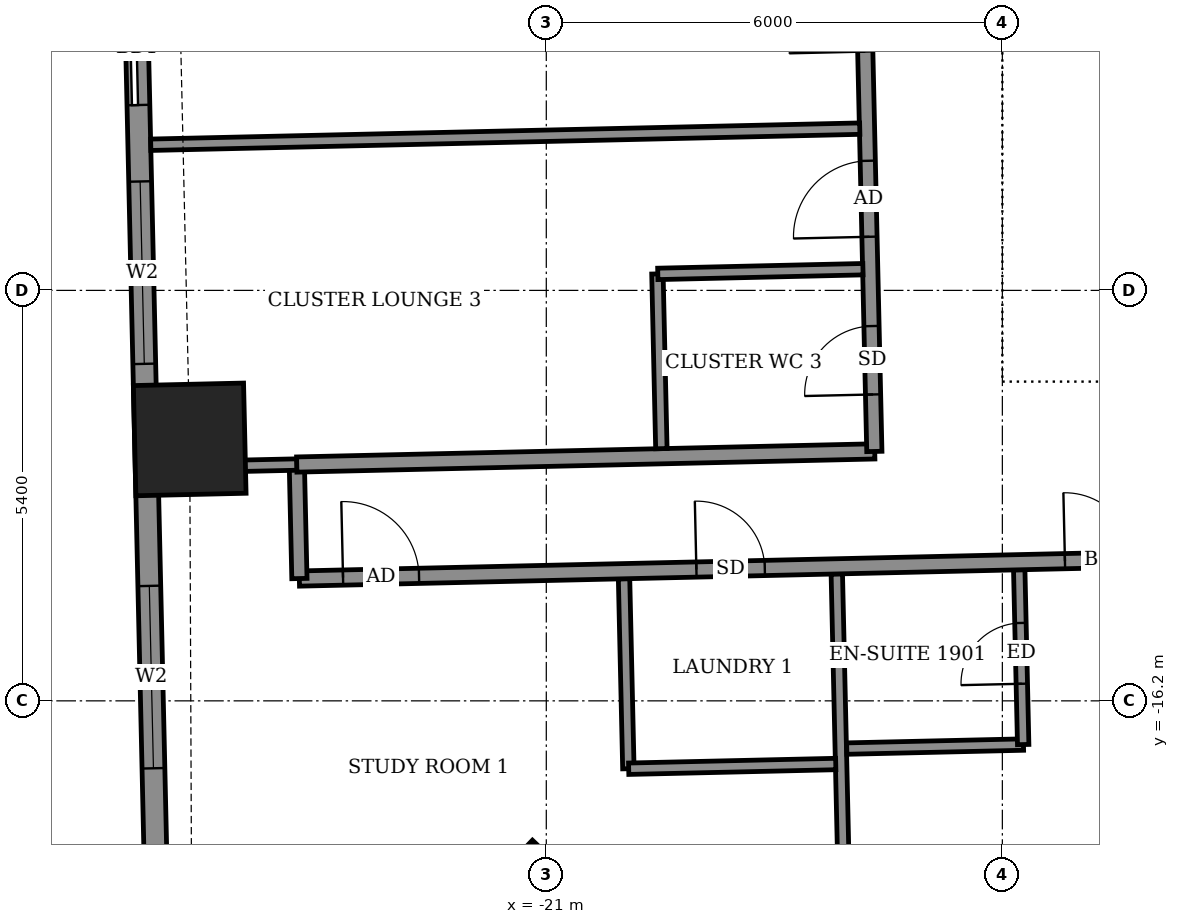
"""IFC4 building model, lengths in metres.
Left out: names, types, materials, properties, quantities, classifications, styles, units other than length and angle.
Written with IfcOpenShell. Run it as: python <this file> out.ifc"""

import sys

from ifc_helpers import new_model, si_unit, direction, frame, frame_2d, origin, origin_2d, place, context, subcontext, project, spatial, rectangle, extrude, element, fill, save


model = new_model("IFC4")
c1 = context("Model", 3, precision=1e-05, world=origin(), true_north=direction((0.0, 1.0)))
c2 = subcontext(c1, "Body", "Model", "MODEL_VIEW")
j1 = project(units=[si_unit("LENGTHUNIT", "METRE"), si_unit("PLANEANGLEUNIT", "RADIAN")], contexts=[c1])
p1 = place(None, origin())
s1 = spatial("IfcSite", under=j1, at=p1, CompositionType="ELEMENT")
p2 = place(p1, origin())
s2 = spatial("IfcBuilding", under=s1, at=p2, CompositionType="ELEMENT")
p3 = place(p2, frame((0.0, 0.0, 79.3)))
s3 = spatial("IfcBuildingStorey", under=s2, at=p3, CompositionType="ELEMENT", Elevation=79.3)
for number, where, z_axis, x_axis in (
    (1, (-25.691, -12.76, -0.55), (0.0, 0.0, 1.0), (0.023, -1.0, 0.0)),
    (2, (-21.159, -19.059, -0.55), (0.0, 0.0, 1.0), (0.723, -0.691, 0.0)),
):
    element("IfcColumn", number, at=place(p3, frame(where, z_axis=z_axis, x_axis=x_axis)), inside=s3, PredefinedType="COLUMN", context=c2, shape_type="SweptSolid", body=[
        extrude(rectangle(XDim=1.45, YDim=1.45, at=origin_2d()), origin(), (0.0, 0.0, 1.0), 3.6),
    ])
p4 = place(p3, frame((-26.424, -5.808, 0.0), z_axis=(0.0, 0.0, 1.0), x_axis=(0.022654755793, -0.999743348085, 0.0)))
e3 = element("IfcWall", 3, at=p4, inside=s3, PredefinedType="SOLIDWALL", context=c2, shape_type="SweptSolid", body=[
    extrude(rectangle(XDim=13.729, YDim=0.3, at=frame_2d((6.865, 0.0))), origin(), (0.0, 0.0, 1.0), 3.05),
])
p5 = place(p4, frame((1.054, 0.0, 0.0)))
e4 = element("IfcOpeningElement", 4, at=p5, cuts=e3, PredefinedType="OPENING", context=c2, shape_type="SweptSolid", body=[
    extrude(rectangle(XDim=1.5, YDim=2.4, at=frame_2d((0.75, 1.2))), frame((0.0, 0.16, 0.0), z_axis=(0.0, -1.0, 0.0), x_axis=(1.0, 0.0, 0.0)), (0.0, 0.0, 1.0), 0.32),
])
p6 = place(p4, frame((3.56, 0.0, 0.9)))
e5 = element("IfcOpeningElement", 5, at=p6, cuts=e3, PredefinedType="OPENING", context=c2, shape_type="SweptSolid", body=[
    extrude(rectangle(XDim=2.4, YDim=1.5, at=frame_2d((1.2, 0.75))), frame((0.0, 0.16, 0.0), z_axis=(0.0, -1.0, 0.0), x_axis=(1.0, 0.0, 0.0)), (0.0, 0.0, 1.0), 0.32),
])
p7 = place(p4, frame((8.882, 0.0, 0.9)))
e6 = element("IfcOpeningElement", 6, at=p7, cuts=e3, PredefinedType="OPENING", context=c2, shape_type="SweptSolid", body=[
    extrude(rectangle(XDim=2.4, YDim=1.5, at=frame_2d((1.2, 0.75))), frame((0.0, 0.16, 0.0), z_axis=(0.0, -1.0, 0.0), x_axis=(1.0, 0.0, 0.0)), (0.0, 0.0, 1.0), 0.32),
])
p8 = place(p3, frame((-16.968, -23.778, 0.0), z_axis=(0.0, 0.0, 1.0), x_axis=(-0.022697424684, 0.999742380272, 0.0)))
e7 = element("IfcWall", 7, at=p8, inside=s3, PredefinedType="PARTITIONING", context=c2, shape_type="SweptSolid", body=[
    extrude(rectangle(XDim=9.25, YDim=0.15, at=frame_2d((4.625, 0.0))), origin(), (0.0, 0.0, 1.0), 2.55),
])
p9 = place(p3, frame((-19.92, -17.093, 0.0), z_axis=(0.0, 0.0, 1.0), x_axis=(-0.022854521249, 0.999738801317, 0.0)))
e8 = element("IfcWall", 8, at=p9, inside=s3, PredefinedType="PARTITIONING", context=c2, shape_type="SweptSolid", body=[
    extrude(rectangle(XDim=2.5, YDim=0.15, at=frame_2d((1.25, 0.0))), origin(), (0.0, 0.0, 1.0), 3.05),
])
p10 = place(p3, frame((-19.916, -17.093, 0.0), z_axis=(0.0, 0.0, 1.0), x_axis=(0.999741002259, 0.022758040381, 0.0)))
e9 = element("IfcWall", 9, at=p10, inside=s3, PredefinedType="PARTITIONING", context=c2, shape_type="SweptSolid", body=[
    extrude(rectangle(XDim=2.725, YDim=0.15, at=frame_2d((1.362, 0.0))), origin(), (0.0, 0.0, 1.0), 3.05),
])
p11 = place(p3, frame((-17.047, -16.828, 0.0), z_axis=(0.0, 0.0, 1.0), x_axis=(0.99974053329, 0.022778632478, 0.0)))
e10 = element("IfcWall", 10, at=p11, inside=s3, PredefinedType="PARTITIONING", context=c2, shape_type="SweptSolid", body=[
    extrude(rectangle(XDim=2.326, YDim=0.15, at=frame_2d((1.163, 0.0))), origin(), (0.0, 0.0, 1.0), 3.05),
])
p12 = place(p3, frame((-14.726, -16.775, 0.0), z_axis=(0.0, 0.0, 1.0), x_axis=(-0.022615284993, 0.999744241736, 0.0)))
e11 = element("IfcWall", 11, at=p12, inside=s3, PredefinedType="PARTITIONING", context=c2, shape_type="SweptSolid", body=[
    extrude(rectangle(XDim=2.299, YDim=0.15, at=frame_2d((1.15, 0.0))), origin(), (0.0, 0.0, 1.0), 3.05),
])
p13 = place(p12, frame((0.8, 0.0, 0.0)))
e12 = element("IfcOpeningElement", 12, at=p13, cuts=e11, PredefinedType="OPENING", context=c2, shape_type="SweptSolid", body=[
    extrude(rectangle(XDim=0.8, YDim=2.1, at=frame_2d((0.4, 1.05))), frame((0.0, 0.085, 0.0), z_axis=(0.0, -1.0, 0.0), x_axis=(1.0, 0.0, 0.0)), (0.0, 0.0, 1.0), 0.17),
])
p14 = place(p3, frame((-24.249, -14.591, 0.0), z_axis=(0.0, 0.0, 1.0), x_axis=(0.999742227308, 0.022704161211, 0.0)))
e13 = element("IfcWall", 13, at=p14, inside=s3, PredefinedType="PARTITIONING", context=c2, shape_type="SweptSolid", body=[
    extrude(rectangle(XDim=52.421, YDim=0.2, at=frame_2d((26.211, 0.0))), origin(), (0.0, 0.0, 1.0), 3.05),
])
p15 = place(p14, frame((0.575, 0.0, 0.0)))
e14 = element("IfcOpeningElement", 14, at=p15, cuts=e13, PredefinedType="OPENING", context=c2, shape_type="SweptSolid", body=[
    extrude(rectangle(XDim=1.0, YDim=2.1, at=frame_2d((0.5, 1.05))), frame((0.0, 0.11, 0.0), z_axis=(0.0, -1.0, 0.0), x_axis=(1.0, 0.0, 0.0)), (0.0, 0.0, 1.0), 0.22),
])
p16 = place(p14, frame((5.225, 0.0, 0.0)))
e15 = element("IfcOpeningElement", 15, at=p16, cuts=e13, PredefinedType="OPENING", context=c2, shape_type="SweptSolid", body=[
    extrude(rectangle(XDim=0.9, YDim=2.1, at=frame_2d((0.45, 1.05))), frame((0.0, 0.11, 0.0), z_axis=(0.0, -1.0, 0.0), x_axis=(1.0, 0.0, 0.0)), (0.0, 0.0, 1.0), 0.22),
])
p17 = place(p14, frame((10.075, 0.0, 0.0)))
e16 = element("IfcOpeningElement", 16, at=p17, cuts=e13, PredefinedType="OPENING", context=c2, shape_type="SweptSolid", body=[
    extrude(rectangle(XDim=0.9, YDim=2.1, at=frame_2d((0.45, 1.05))), frame((0.0, 0.11, 0.0), z_axis=(0.0, -1.0, 0.0), x_axis=(1.0, 0.0, 0.0)), (0.0, 0.0, 1.0), 0.22),
])
p18 = place(p14, frame((12.1, 0.0, 0.0)))
e17 = element("IfcOpeningElement", 17, at=p18, cuts=e13, PredefinedType="OPENING", context=c2, shape_type="SweptSolid", body=[
    extrude(rectangle(XDim=0.9, YDim=2.1, at=frame_2d((0.45, 1.05))), frame((0.0, 0.11, 0.0), z_axis=(0.0, -1.0, 0.0), x_axis=(1.0, 0.0, 0.0)), (0.0, 0.0, 1.0), 0.22),
])
p19 = place(p14, frame((19.025, 0.0, 0.0)))
e18 = element("IfcOpeningElement", 18, at=p19, cuts=e13, PredefinedType="OPENING", context=c2, shape_type="SweptSolid", body=[
    extrude(rectangle(XDim=0.9, YDim=2.1, at=frame_2d((0.45, 1.05))), frame((0.0, 0.11, 0.0), z_axis=(0.0, -1.0, 0.0), x_axis=(1.0, 0.0, 0.0)), (0.0, 0.0, 1.0), 0.22),
])
p20 = place(p14, frame((21.225, 0.0, 0.0)))
e19 = element("IfcOpeningElement", 19, at=p20, cuts=e13, PredefinedType="OPENING", context=c2, shape_type="SweptSolid", body=[
    extrude(rectangle(XDim=0.9, YDim=2.1, at=frame_2d((0.45, 1.05))), frame((0.0, 0.11, 0.0), z_axis=(0.0, -1.0, 0.0), x_axis=(1.0, 0.0, 0.0)), (0.0, 0.0, 1.0), 0.22),
])
p21 = place(p14, frame((28.175, 0.0, 0.0)))
e20 = element("IfcOpeningElement", 20, at=p21, cuts=e13, PredefinedType="OPENING", context=c2, shape_type="SweptSolid", body=[
    extrude(rectangle(XDim=0.9, YDim=2.1, at=frame_2d((0.45, 1.05))), frame((0.0, 0.11, 0.0), z_axis=(0.0, -1.0, 0.0), x_axis=(1.0, 0.0, 0.0)), (0.0, 0.0, 1.0), 0.22),
])
p22 = place(p14, frame((30.425, 0.0, 0.0)))
e21 = element("IfcOpeningElement", 21, at=p22, cuts=e13, PredefinedType="OPENING", context=c2, shape_type="SweptSolid", body=[
    extrude(rectangle(XDim=0.9, YDim=2.1, at=frame_2d((0.45, 1.05))), frame((0.0, 0.11, 0.0), z_axis=(0.0, -1.0, 0.0), x_axis=(1.0, 0.0, 0.0)), (0.0, 0.0, 1.0), 0.22),
])
p23 = place(p14, frame((37.4, 0.0, 0.0)))
e22 = element("IfcOpeningElement", 22, at=p23, cuts=e13, PredefinedType="OPENING", context=c2, shape_type="SweptSolid", body=[
    extrude(rectangle(XDim=0.9, YDim=2.1, at=frame_2d((0.45, 1.05))), frame((0.0, 0.11, 0.0), z_axis=(0.0, -1.0, 0.0), x_axis=(1.0, 0.0, 0.0)), (0.0, 0.0, 1.0), 0.22),
])
p24 = place(p14, frame((39.375, 0.0, 0.0)))
e23 = element("IfcOpeningElement", 23, at=p24, cuts=e13, PredefinedType="OPENING", context=c2, shape_type="SweptSolid", body=[
    extrude(rectangle(XDim=0.9, YDim=2.1, at=frame_2d((0.45, 1.05))), frame((0.0, 0.11, 0.0), z_axis=(0.0, -1.0, 0.0), x_axis=(1.0, 0.0, 0.0)), (0.0, 0.0, 1.0), 0.22),
])
p25 = place(p14, frame((49.661, 0.0, 0.0)))
e24 = element("IfcOpeningElement", 24, at=p25, cuts=e13, PredefinedType="OPENING", context=c2, shape_type="SweptSolid", body=[
    extrude(rectangle(XDim=1.0, YDim=2.1, at=frame_2d((0.5, 1.05))), frame((0.0, 0.11, 0.0), z_axis=(0.0, -1.0, 0.0), x_axis=(1.0, 0.0, 0.0)), (0.0, 0.0, 1.0), 0.22),
])
p26 = place(p14, frame((44.025, 0.0, 0.0)))
e25 = element("IfcOpeningElement", 25, at=p26, cuts=e13, PredefinedType="OPENING", context=c2, shape_type="SweptSolid", body=[
    extrude(rectangle(XDim=0.9, YDim=2.1, at=frame_2d((0.45, 1.05))), frame((0.0, 0.11, 0.0), z_axis=(0.0, -1.0, 0.0), x_axis=(1.0, 0.0, 0.0)), (0.0, 0.0, 1.0), 0.22),
])
p27 = place(p3, frame((-24.248, -14.591, 0.0), z_axis=(0.0, 0.0, 1.0), x_axis=(-0.022617910375, 0.999744182344, 0.0)))
e26 = element("IfcWall", 26, at=p27, inside=s3, PredefinedType="PARTITIONING", context=c2, shape_type="SweptSolid", body=[
    extrude(rectangle(XDim=1.5, YDim=0.2, at=frame_2d((0.75, 0.0))), origin(), (0.0, 0.0, 1.0), 3.05),
])
p28 = place(p3, frame((-26.108, -13.132, 0.0), z_axis=(0.0, 0.0, 1.0), x_axis=(0.999748611628, 0.02242127443, 0.0)))
e27 = element("IfcWall", 27, at=p28, inside=s3, PredefinedType="PARTITIONING", context=c2, shape_type="SweptSolid", body=[
    extrude(rectangle(XDim=1.829, YDim=0.15, at=frame_2d((0.915, 0.0))), origin(), (0.0, 0.0, 1.0), 3.05),
])
p29 = place(p3, frame((-24.283, -13.091, 0.0), z_axis=(0.0, 0.0, 1.0), x_axis=(0.999741006317, 0.022757862116, 0.0)))
e28 = element("IfcWall", 28, at=p29, inside=s3, PredefinedType="PARTITIONING", context=c2, shape_type="SweptSolid", body=[
    extrude(rectangle(XDim=7.606, YDim=0.2, at=frame_2d((3.803, 0.0))), origin(), (0.0, 0.0, 1.0), 3.05),
])
p30 = place(p3, frame((-19.486, -12.882, 0.0), z_axis=(0.0, 0.0, 1.0), x_axis=(-0.022612884682, 0.999744296031, 0.0)))
e29 = element("IfcWall", 29, at=p30, inside=s3, PredefinedType="PARTITIONING", context=c2, shape_type="SweptSolid", body=[
    extrude(rectangle(XDim=2.3, YDim=0.15, at=frame_2d((1.15, 0.0))), origin(), (0.0, 0.0, 1.0), 3.05),
])
p31 = place(p3, frame((-16.684, -12.919, 0.0), z_axis=(0.0, 0.0, 1.0), x_axis=(-0.022706151961, 0.999742182097, 0.0)))
e30 = element("IfcWall", 30, at=p31, inside=s3, PredefinedType="PARTITIONING", context=c2, shape_type="SweptSolid", body=[
    extrude(rectangle(XDim=25.45, YDim=0.2, at=frame_2d((12.725, 0.0))), origin(), (0.0, 0.0, 1.0), 3.05),
])
p32 = place(p31, frame((23.938, 0.0, 0.0)))
e31 = element("IfcOpeningElement", 31, at=p32, cuts=e30, PredefinedType="OPENING", context=c2, shape_type="SweptSolid", body=[
    extrude(rectangle(XDim=1.0, YDim=2.1, at=frame_2d((0.5, 1.05))), frame((0.0, 0.11, 0.0), z_axis=(0.0, -1.0, 0.0), x_axis=(1.0, 0.0, 0.0)), (0.0, 0.0, 1.0), 0.22),
])
p33 = place(p31, frame((21.775, 0.0, 0.0)))
e32 = element("IfcOpeningElement", 32, at=p33, cuts=e30, PredefinedType="OPENING", context=c2, shape_type="SweptSolid", body=[
    extrude(rectangle(XDim=0.9, YDim=2.1, at=frame_2d((0.45, 1.05))), frame((0.0, 0.11, 0.0), z_axis=(0.0, -1.0, 0.0), x_axis=(1.0, 0.0, 0.0)), (0.0, 0.0, 1.0), 0.22),
])
p34 = place(p31, frame((16.825, 0.0, 0.0)))
e33 = element("IfcOpeningElement", 33, at=p34, cuts=e30, PredefinedType="OPENING", context=c2, shape_type="SweptSolid", body=[
    extrude(rectangle(XDim=1.0, YDim=2.1, at=frame_2d((0.5, 1.05))), frame((0.0, 0.11, 0.0), z_axis=(0.0, -1.0, 0.0), x_axis=(1.0, 0.0, 0.0)), (0.0, 0.0, 1.0), 0.22),
])
p35 = place(p31, frame((19.175, 0.0, 0.0)))
e34 = element("IfcOpeningElement", 34, at=p35, cuts=e30, PredefinedType="OPENING", context=c2, shape_type="SweptSolid", body=[
    extrude(rectangle(XDim=0.9, YDim=2.1, at=frame_2d((0.45, 1.05))), frame((0.0, 0.11, 0.0), z_axis=(0.0, -1.0, 0.0), x_axis=(1.0, 0.0, 0.0)), (0.0, 0.0, 1.0), 0.22),
])
p36 = place(p31, frame((14.9, 0.0, 0.0)))
e35 = element("IfcOpeningElement", 35, at=p36, cuts=e30, PredefinedType="OPENING", context=c2, shape_type="SweptSolid", body=[
    extrude(rectangle(XDim=1.0, YDim=2.1, at=frame_2d((0.5, 1.05))), frame((0.0, 0.11, 0.0), z_axis=(0.0, -1.0, 0.0), x_axis=(1.0, 0.0, 0.0)), (0.0, 0.0, 1.0), 0.22),
])
p37 = place(p31, frame((12.625, 0.0, 0.0)))
e36 = element("IfcOpeningElement", 36, at=p37, cuts=e30, PredefinedType="OPENING", context=c2, shape_type="SweptSolid", body=[
    extrude(rectangle(XDim=0.9, YDim=2.1, at=frame_2d((0.45, 1.05))), frame((0.0, 0.11, 0.0), z_axis=(0.0, -1.0, 0.0), x_axis=(1.0, 0.0, 0.0)), (0.0, 0.0, 1.0), 0.22),
])
p38 = place(p31, frame((10.225, 0.0, 0.0)))
e37 = element("IfcOpeningElement", 37, at=p38, cuts=e30, PredefinedType="OPENING", context=c2, shape_type="SweptSolid", body=[
    extrude(rectangle(XDim=1.0, YDim=2.1, at=frame_2d((0.5, 1.05))), frame((0.0, 0.11, 0.0), z_axis=(0.0, -1.0, 0.0), x_axis=(1.0, 0.0, 0.0)), (0.0, 0.0, 1.0), 0.22),
])
p39 = place(p31, frame((8.025, 0.0, 0.0)))
e38 = element("IfcOpeningElement", 38, at=p39, cuts=e30, PredefinedType="OPENING", context=c2, shape_type="SweptSolid", body=[
    extrude(rectangle(XDim=0.9, YDim=2.1, at=frame_2d((0.45, 1.05))), frame((0.0, 0.11, 0.0), z_axis=(0.0, -1.0, 0.0), x_axis=(1.0, 0.0, 0.0)), (0.0, 0.0, 1.0), 0.22),
])
p40 = place(p31, frame((5.262, 0.0, 0.0)))
e39 = element("IfcOpeningElement", 39, at=p40, cuts=e30, PredefinedType="OPENING", context=c2, shape_type="SweptSolid", body=[
    extrude(rectangle(XDim=1.0, YDim=2.1, at=frame_2d((0.5, 1.05))), frame((0.0, 0.11, 0.0), z_axis=(0.0, -1.0, 0.0), x_axis=(1.0, 0.0, 0.0)), (0.0, 0.0, 1.0), 0.22),
])
p41 = place(p31, frame((2.825, 0.0, 0.0)))
e40 = element("IfcOpeningElement", 40, at=p41, cuts=e30, PredefinedType="OPENING", context=c2, shape_type="SweptSolid", body=[
    extrude(rectangle(XDim=1.0, YDim=2.1, at=frame_2d((0.5, 1.05))), frame((0.0, 0.11, 0.0), z_axis=(0.0, -1.0, 0.0), x_axis=(1.0, 0.0, 0.0)), (0.0, 0.0, 1.0), 0.22),
])
p42 = place(p31, frame((0.75, 0.0, 0.0)))
e41 = element("IfcOpeningElement", 41, at=p42, cuts=e30, PredefinedType="OPENING", context=c2, shape_type="SweptSolid", body=[
    extrude(rectangle(XDim=0.9, YDim=2.1, at=frame_2d((0.45, 1.05))), frame((0.0, 0.11, 0.0), z_axis=(0.0, -1.0, 0.0), x_axis=(1.0, 0.0, 0.0)), (0.0, 0.0, 1.0), 0.22),
])
p43 = place(p3, frame((-19.533, -10.583, 0.0), z_axis=(0.0, 0.0, 1.0), x_axis=(0.999736155505, 0.022969966847, 0.0)))
e42 = element("IfcWall", 42, at=p43, inside=s3, PredefinedType="PARTITIONING", context=c2, shape_type="SweptSolid", body=[
    extrude(rectangle(XDim=2.7, YDim=0.15, at=frame_2d((1.35, 0.0))), origin(), (0.0, 0.0, 1.0), 3.05),
])
p44 = place(p3, frame((-26.204, -8.884, 0.0), z_axis=(0.0, 0.0, 1.0), x_axis=(0.999742051634, 0.022711895436, 0.0)))
e43 = element("IfcWall", 43, at=p44, inside=s3, PredefinedType="PARTITIONING", context=c2, shape_type="SweptSolid", body=[
    extrude(rectangle(XDim=9.331, YDim=0.15, at=frame_2d((4.665, 0.0))), origin(), (0.0, 0.0, 1.0), 2.55),
])
p45 = place(p3, frame((-14.9, -11.35, 0.0), z_axis=(0.0, 0.0, 1.0), x_axis=(1.0, 0.0, 0.0)))
e44 = element("IfcWall", 44, at=p45, inside=s3, PredefinedType="SHEAR", context=c2, shape_type="SweptSolid", body=[
    extrude(rectangle(XDim=29.8, YDim=1.1, at=frame_2d((14.9, 0.0))), origin(), (0.0, 0.0, 1.0), 3.6),
])
p46 = place(p3, frame((-14.35, -10.8, 0.0), z_axis=(0.0, 0.0, 1.0), x_axis=(0.0, 1.0, 0.0)))
e45 = element("IfcWall", 45, at=p46, inside=s3, PredefinedType="SHEAR", context=c2, shape_type="SweptSolid", body=[
    extrude(rectangle(XDim=21.6, YDim=1.1, at=frame_2d((10.8, 0.0))), origin(), (0.0, 0.0, 1.0), 3.6),
])
p47 = place(p46, frame((8.25, 0.0, 0.0)))
e46 = element("IfcOpeningElement", 46, at=p47, cuts=e45, PredefinedType="OPENING", context=c2, shape_type="SweptSolid", body=[
    extrude(rectangle(XDim=1.2, YDim=2.1, at=frame_2d((0.6, 1.05))), frame((0.0, 0.56, 0.0), z_axis=(0.0, -1.0, 0.0), x_axis=(1.0, 0.0, 0.0)), (0.0, 0.0, 1.0), 1.12),
])
p48 = place(p46, frame((15.25, 0.0, 0.0)))
e47 = element("IfcOpeningElement", 47, at=p48, cuts=e45, PredefinedType="OPENING", context=c2, shape_type="SweptSolid", body=[
    extrude(rectangle(XDim=1.2, YDim=2.1, at=frame_2d((0.6, 1.05))), frame((0.0, 0.56, 0.0), z_axis=(0.0, -1.0, 0.0), x_axis=(1.0, 0.0, 0.0)), (0.0, 0.0, 1.0), 1.12),
])
p49 = place(p5, origin())
e48 = element("IfcDoor", 48, at=p49, inside=s3, OperationType="SLIDING_TO_LEFT", PredefinedType="DOOR", context=c2, shape_type="SweptSolid", body=[
    extrude(rectangle(XDim=1.5, YDim=2.4, at=frame_2d((0.75, 1.2))), frame((0.0, 0.025, 0.0), z_axis=(0.0, -1.0, 0.0), x_axis=(1.0, 0.0, 0.0)), (0.0, 0.0, 1.0), 0.05),
])
fill(e4, e48)
p50 = place(p6, origin())
e49 = element("IfcWindow", 49, at=p50, inside=s3, PartitioningType="DOUBLE_PANEL_VERTICAL", PredefinedType="WINDOW", context=c2, shape_type="SweptSolid", body=[
    extrude(rectangle(XDim=2.4, YDim=1.5, at=frame_2d((1.2, 0.75))), frame((0.0, 0.03, 0.0), z_axis=(0.0, -1.0, 0.0), x_axis=(1.0, 0.0, 0.0)), (0.0, 0.0, 1.0), 0.06),
])
fill(e5, e49)
p51 = place(p7, origin())
e50 = element("IfcWindow", 50, at=p51, inside=s3, PartitioningType="DOUBLE_PANEL_VERTICAL", PredefinedType="WINDOW", context=c2, shape_type="SweptSolid", body=[
    extrude(rectangle(XDim=2.4, YDim=1.5, at=frame_2d((1.2, 0.75))), frame((0.0, 0.03, 0.0), z_axis=(0.0, -1.0, 0.0), x_axis=(1.0, 0.0, 0.0)), (0.0, 0.0, 1.0), 0.06),
])
fill(e6, e50)
p52 = place(p15, origin())
e51 = element("IfcDoor", 51, at=p52, inside=s3, OperationType="SINGLE_SWING_LEFT", PredefinedType="DOOR", context=c2, shape_type="SweptSolid", body=[
    extrude(rectangle(XDim=1.0, YDim=2.1, at=frame_2d((0.5, 1.05))), frame((0.0, 0.025, 0.0), z_axis=(0.0, -1.0, 0.0), x_axis=(1.0, 0.0, 0.0)), (0.0, 0.0, 1.0), 0.05),
])
fill(e14, e51)
p53 = place(p16, origin())
e52 = element("IfcDoor", 52, at=p53, inside=s3, OperationType="SINGLE_SWING_LEFT", PredefinedType="DOOR", context=c2, shape_type="SweptSolid", body=[
    extrude(rectangle(XDim=0.9, YDim=2.1, at=frame_2d((0.45, 1.05))), frame((0.0, 0.025, 0.0), z_axis=(0.0, -1.0, 0.0), x_axis=(1.0, 0.0, 0.0)), (0.0, 0.0, 1.0), 0.05),
])
fill(e15, e52)
p54 = place(p17, origin())
e53 = element("IfcDoor", 53, at=p54, inside=s3, OperationType="SINGLE_SWING_LEFT", PredefinedType="DOOR", context=c2, shape_type="SweptSolid", body=[
    extrude(rectangle(XDim=0.9, YDim=2.1, at=frame_2d((0.45, 1.05))), frame((0.0, 0.025, 0.0), z_axis=(0.0, -1.0, 0.0), x_axis=(1.0, 0.0, 0.0)), (0.0, 0.0, 1.0), 0.05),
])
fill(e16, e53)
p55 = place(p13, origin())
e54 = element("IfcDoor", 54, at=p55, inside=s3, OperationType="SINGLE_SWING_LEFT", PredefinedType="DOOR", context=c2, shape_type="SweptSolid", body=[
    extrude(rectangle(XDim=0.8, YDim=2.1, at=frame_2d((0.4, 1.05))), frame((0.0, 0.025, 0.0), z_axis=(0.0, -1.0, 0.0), x_axis=(1.0, 0.0, 0.0)), (0.0, 0.0, 1.0), 0.05),
])
fill(e12, e54)
p56 = place(p41, origin())
e55 = element("IfcDoor", 55, at=p56, inside=s3, OperationType="SINGLE_SWING_RIGHT", PredefinedType="DOOR", context=c2, shape_type="SweptSolid", body=[
    extrude(rectangle(XDim=1.0, YDim=2.1, at=frame_2d((0.5, 1.05))), frame((0.0, 0.025, 0.0), z_axis=(0.0, -1.0, 0.0), x_axis=(1.0, 0.0, 0.0)), (0.0, 0.0, 1.0), 0.05),
])
fill(e40, e55)
p57 = place(p42, origin())
e56 = element("IfcDoor", 56, at=p57, inside=s3, OperationType="SINGLE_SWING_LEFT", PredefinedType="DOOR", context=c2, shape_type="SweptSolid", body=[
    extrude(rectangle(XDim=0.9, YDim=2.1, at=frame_2d((0.45, 1.05))), frame((0.0, 0.025, 0.0), z_axis=(0.0, -1.0, 0.0), x_axis=(1.0, 0.0, 0.0)), (0.0, 0.0, 1.0), 0.05),
])
fill(e41, e56)
save(model, sys.argv[1])
